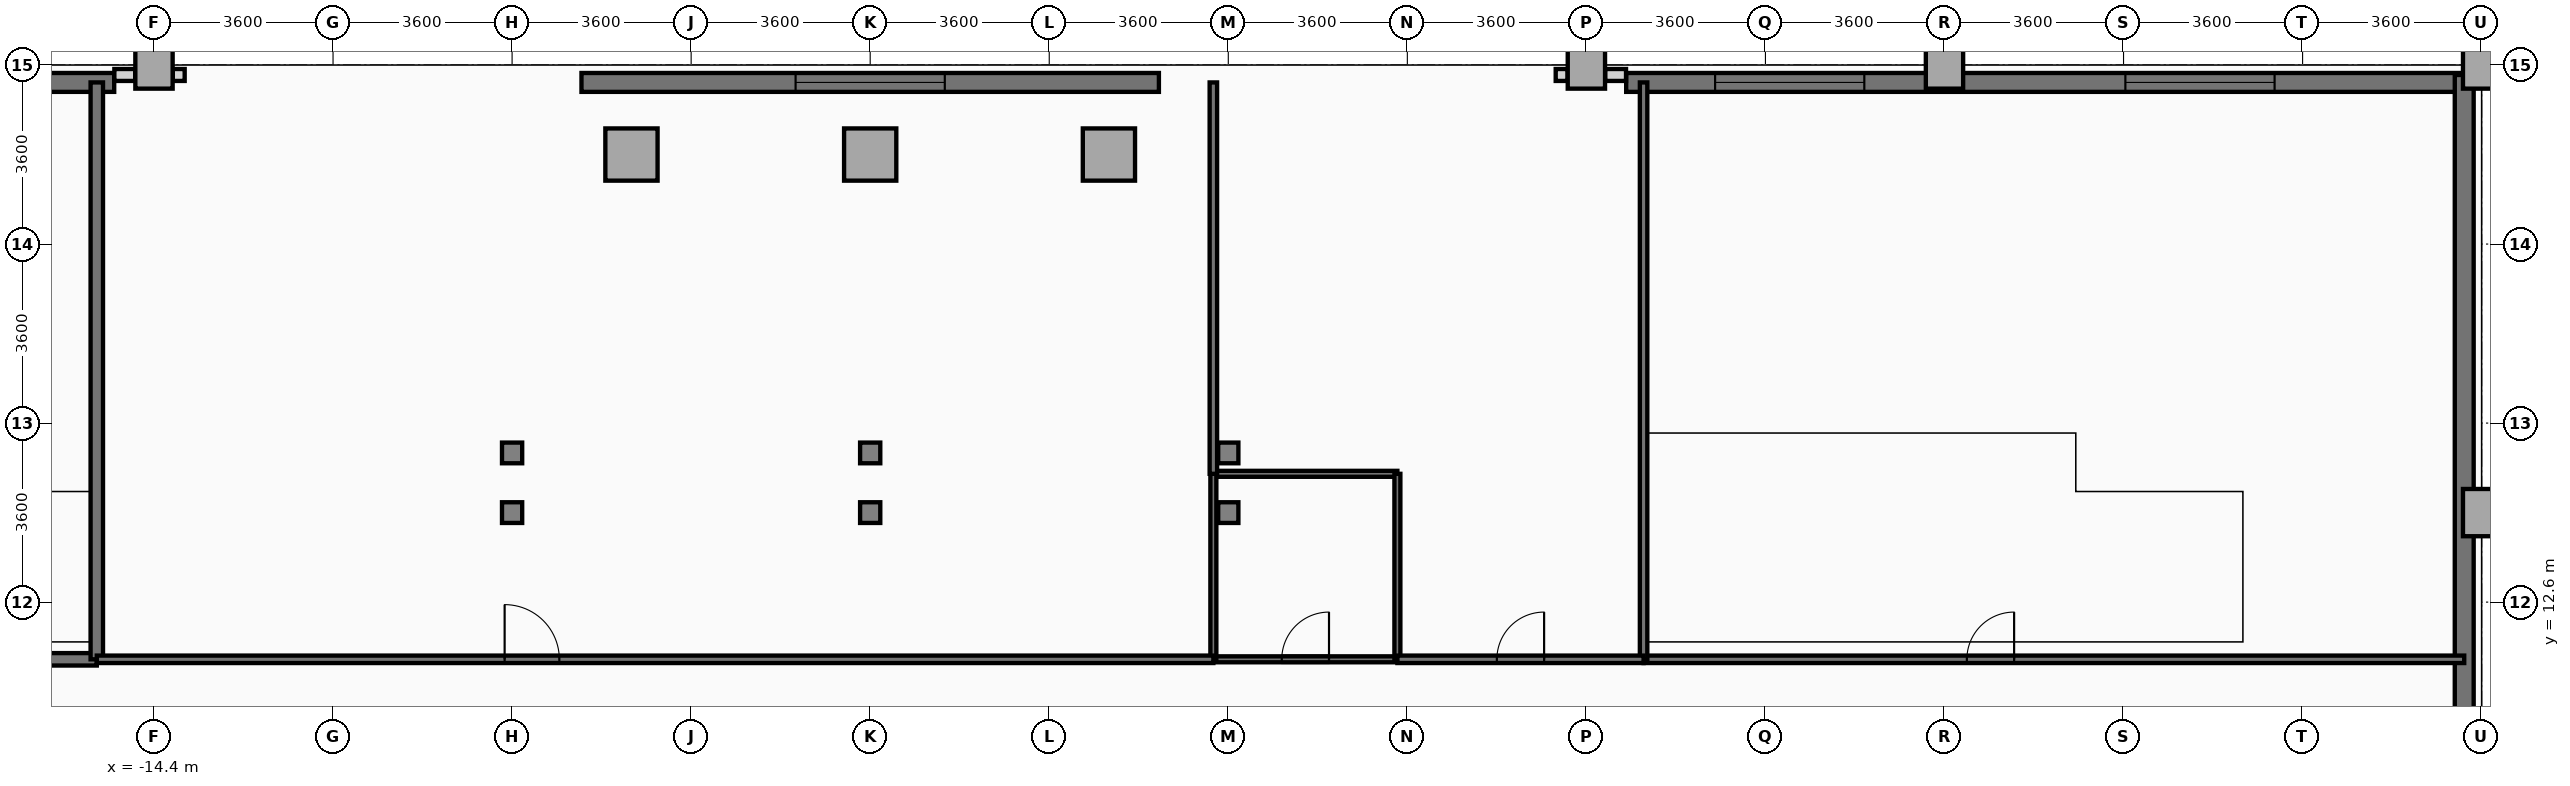
"""IFC4 building model, lengths in metres.
Left out: names, types, materials, properties, quantities, classifications, styles, units other than length and angle.
Written with IfcOpenShell. Run it as: python <this file> out.ifc"""

import sys

from ifc_helpers import new_model, si_unit, direction, frame, frame_2d, origin, origin_2d, place, context, subcontext, project, spatial, rectangle, i_section, extrude, source, transform, mapped, element, fill, save


model = new_model("IFC4")
c1 = context("Model", 3, precision=1e-05, world=origin(), true_north=direction((0.0, 1.0)))
c2 = subcontext(c1, "Body", "Model", "MODEL_VIEW")
j1 = project(units=[si_unit("LENGTHUNIT", "METRE"), si_unit("PLANEANGLEUNIT", "RADIAN")], contexts=[c1])
p1 = place(None, origin())
s1 = spatial("IfcSite", under=j1, at=p1, CompositionType="ELEMENT")
p2 = place(p1, origin())
s2 = spatial("IfcBuilding", under=s1, at=p2, CompositionType="ELEMENT")
p3 = place(p2, frame((0.0, 0.0, 10.2)))
s3 = spatial("IfcBuildingStorey", under=s2, at=p3, CompositionType="ELEMENT", Elevation=10.2)
m1 = source(origin(), c2, "Body", "SweptSolid", [
    extrude(rectangle(XDim=0.75, YDim=0.95, at=origin_2d()), origin(), (0.0, 0.0, 1.0), 5.15),
])
p4 = place(p3, frame((-14.4, 23.4, 0.0), z_axis=(0.0, 0.0, 1.0), x_axis=(1.0, 0.0, 0.0)))
e1 = element("IfcColumn", 1, at=p4, inside=s3, PredefinedType="COLUMN", context=c2, shape_type="MappedRepresentation", body=[
    mapped(m1, transform((0.0, 0.0, 0.0), x_axis=(1.0, 0.0, 0.0), y_axis=(0.0, 1.0, 0.0), z_axis=(0.0, 0.0, 1.0), scale=1.0)),
])
m2 = source(origin(), c2, "Body", "SweptSolid", [
    extrude(i_section(OverallWidth=0.406, OverallDepth=0.416, WebThickness=0.024, FlangeThickness=0.039, at=origin_2d()), origin(), (0.0, 0.0, 1.0), 5.15),
])
for number, where, z_axis, x_axis in (
    (2, (-7.2, 14.4, 0.0), (0.0, 0.0, 1.0), (1.0, 0.0, 0.0)),
    (3, (-7.2, 15.6, 0.0), (0.0, 0.0, 1.0), (1.0, 0.0, 0.0)),
):
    element("IfcColumn", number, at=place(p3, frame(where, z_axis=z_axis, x_axis=x_axis)), inside=s3, PredefinedType="COLUMN", context=c2, shape_type="MappedRepresentation", body=[
        mapped(m2, transform((0.0, 0.0, 0.0), x_axis=(1.0, 0.0, 0.0), y_axis=(0.0, 1.0, 0.0), z_axis=(0.0, 0.0, 1.0), scale=1.0)),
    ])
m3 = source(origin(), c2, "Body", "SweptSolid", [
    extrude(rectangle(XDim=1.05, YDim=1.05, at=origin_2d()), origin(), (0.0, 0.0, 1.0), 5.15),
])
p5 = place(p3, frame((-4.8, 21.6, 0.0), z_axis=(0.0, 0.0, 1.0), x_axis=(1.0, 0.0, 0.0)))
e4 = element("IfcColumn", 4, at=p5, inside=s3, PredefinedType="COLUMN", context=c2, shape_type="MappedRepresentation", body=[
    mapped(m3, transform((0.0, 0.0, 0.0), x_axis=(1.0, 0.0, 0.0), y_axis=(0.0, 1.0, 0.0), z_axis=(0.0, 0.0, 1.0), scale=1.0)),
])
for number, where, z_axis, x_axis in (
    (5, (0.0, 14.4, 0.0), (0.0, 0.0, 1.0), (1.0, 0.0, 0.0)),
    (6, (0.0, 15.6, 0.0), (0.0, 0.0, 1.0), (1.0, 0.0, 0.0)),
):
    element("IfcColumn", number, at=place(p3, frame(where, z_axis=z_axis, x_axis=x_axis)), inside=s3, PredefinedType="COLUMN", context=c2, shape_type="MappedRepresentation", body=[
        mapped(m2, transform((0.0, 0.0, 0.0), x_axis=(1.0, 0.0, 0.0), y_axis=(0.0, 1.0, 0.0), z_axis=(0.0, 0.0, 1.0), scale=1.0)),
    ])
for number, where, z_axis, x_axis in (
    (7, (0.0, 21.6, 0.0), (0.0, 0.0, 1.0), (1.0, 0.0, 0.0)),
    (8, (4.8, 21.6, 0.0), (0.0, 0.0, 1.0), (1.0, 0.0, 0.0)),
):
    element("IfcColumn", number, at=place(p3, frame(where, z_axis=z_axis, x_axis=x_axis)), inside=s3, PredefinedType="COLUMN", context=c2, shape_type="MappedRepresentation", body=[
        mapped(m3, transform((0.0, 0.0, 0.0), x_axis=(1.0, 0.0, 0.0), y_axis=(0.0, 1.0, 0.0), z_axis=(0.0, 0.0, 1.0), scale=1.0)),
    ])
for number, where, z_axis, x_axis in (
    (9, (7.2, 14.4, 0.0), (0.0, 0.0, 1.0), (1.0, 0.0, 0.0)),
    (10, (7.2, 15.6, 0.0), (0.0, 0.0, 1.0), (1.0, 0.0, 0.0)),
):
    element("IfcColumn", number, at=place(p3, frame(where, z_axis=z_axis, x_axis=x_axis)), inside=s3, PredefinedType="COLUMN", context=c2, shape_type="MappedRepresentation", body=[
        mapped(m2, transform((0.0, 0.0, 0.0), x_axis=(1.0, 0.0, 0.0), y_axis=(0.0, 1.0, 0.0), z_axis=(0.0, 0.0, 1.0), scale=1.0)),
    ])
for number, where, z_axis, x_axis in (
    (11, (14.4, 23.4, 0.0), (0.0, 0.0, 1.0), (1.0, 0.0, 0.0)),
    (12, (21.6, 23.4, 0.0), (0.0, 0.0, 1.0), (1.0, 0.0, 0.0)),
    (13, (32.4, 14.4, 0.0), (0.0, 0.0, 1.0), (1.0, 0.0, 0.0)),
    (14, (32.4, 23.4, 0.0), (0.0, 0.0, 1.0), (1.0, 0.0, 0.0)),
):
    element("IfcColumn", number, at=place(p3, frame(where, z_axis=z_axis, x_axis=x_axis)), inside=s3, PredefinedType="COLUMN", context=c2, shape_type="MappedRepresentation", body=[
        mapped(m1, transform((0.0, 0.0, 0.0), x_axis=(1.0, 0.0, 0.0), y_axis=(0.0, 1.0, 0.0), z_axis=(0.0, 0.0, 1.0), scale=1.0)),
    ])
p6 = place(p3, frame((-32.05, 23.05, 0.0), z_axis=(0.0, 0.0, 1.0), x_axis=(1.0, 0.0, 0.0)))
e15 = element("IfcWall", 15, at=p6, inside=s3, PredefinedType="SOLIDWALL", context=c2, shape_type="SweptSolid", body=[
    extrude(rectangle(XDim=16.85, YDim=0.38, at=frame_2d((8.425, 0.0))), origin(), (0.0, 0.0, 1.0), 4.4),
])
p7 = place(p6, frame((3.812, 0.0, 0.95)))
e16 = element("IfcOpeningElement", 16, at=p7, cuts=e15, PredefinedType="OPENING", context=c2, shape_type="SweptSolid", body=[
    extrude(rectangle(XDim=3.0, YDim=2.4, at=frame_2d((1.5, 1.2))), frame((0.0, 0.2, 0.0), z_axis=(0.0, -1.0, 0.0), x_axis=(1.0, 0.0, 0.0)), (0.0, 0.0, 1.0), 0.4),
])
p8 = place(p6, frame((12.062, 0.0, 0.95)))
e17 = element("IfcOpeningElement", 17, at=p8, cuts=e15, PredefinedType="OPENING", context=c2, shape_type="SweptSolid", body=[
    extrude(rectangle(XDim=3.0, YDim=2.4, at=frame_2d((1.5, 1.2))), frame((0.0, 0.2, 0.0), z_axis=(0.0, -1.0, 0.0), x_axis=(1.0, 0.0, 0.0)), (0.0, 0.0, 1.0), 0.4),
])
p9 = place(p3, frame((15.2, 23.05, 0.0), z_axis=(0.0, 0.0, 1.0), x_axis=(1.0, 0.0, 0.0)))
e18 = element("IfcWall", 18, at=p9, inside=s3, PredefinedType="SOLIDWALL", context=c2, shape_type="SweptSolid", body=[
    extrude(rectangle(XDim=16.85, YDim=0.38, at=frame_2d((8.425, 0.0))), origin(), (0.0, 0.0, 1.0), 4.4),
])
p10 = place(p9, frame((1.788, 0.0, 0.95)))
e19 = element("IfcOpeningElement", 19, at=p10, cuts=e18, PredefinedType="OPENING", context=c2, shape_type="SweptSolid", body=[
    extrude(rectangle(XDim=3.0, YDim=2.4, at=frame_2d((1.5, 1.2))), frame((0.0, 0.2, 0.0), z_axis=(0.0, -1.0, 0.0), x_axis=(1.0, 0.0, 0.0)), (0.0, 0.0, 1.0), 0.4),
])
p11 = place(p9, frame((10.037, 0.0, 0.95)))
e20 = element("IfcOpeningElement", 20, at=p11, cuts=e18, PredefinedType="OPENING", context=c2, shape_type="SweptSolid", body=[
    extrude(rectangle(XDim=3.0, YDim=2.4, at=frame_2d((1.5, 1.2))), frame((0.0, 0.2, 0.0), z_axis=(0.0, -1.0, 0.0), x_axis=(1.0, 0.0, 0.0)), (0.0, 0.0, 1.0), 0.4),
])
p12 = place(p3, frame((32.05, -18.8, 0.0), z_axis=(0.0, 0.0, 1.0), x_axis=(0.0, 1.0, 0.0)))
e21 = element("IfcWall", 21, at=p12, inside=s3, PredefinedType="SOLIDWALL", context=c2, shape_type="SweptSolid", body=[
    extrude(rectangle(XDim=42.0, YDim=0.38, at=frame_2d((21.0, 0.0))), origin(), (0.0, 0.0, 1.0), 4.4),
])
p13 = place(p12, frame((5.6, 0.0, 0.95)))
e22 = element("IfcOpeningElement", 22, at=p13, cuts=e21, PredefinedType="OPENING", context=c2, shape_type="SweptSolid", body=[
    extrude(rectangle(XDim=3.0, YDim=2.4, at=frame_2d((1.5, 1.2))), frame((0.0, 0.2, 0.0), z_axis=(0.0, -1.0, 0.0), x_axis=(1.0, 0.0, 0.0)), (0.0, 0.0, 1.0), 0.4),
])
p14 = place(p12, frame((12.8, 0.0, 0.95)))
e23 = element("IfcOpeningElement", 23, at=p14, cuts=e21, PredefinedType="OPENING", context=c2, shape_type="SweptSolid", body=[
    extrude(rectangle(XDim=3.0, YDim=2.4, at=frame_2d((1.5, 1.2))), frame((0.0, 0.2, 0.0), z_axis=(0.0, -1.0, 0.0), x_axis=(1.0, 0.0, 0.0)), (0.0, 0.0, 1.0), 0.4),
])
p15 = place(p12, frame((21.8, 0.0, 0.95)))
e24 = element("IfcOpeningElement", 24, at=p15, cuts=e21, PredefinedType="OPENING", context=c2, shape_type="SweptSolid", body=[
    extrude(rectangle(XDim=3.0, YDim=2.4, at=frame_2d((1.5, 1.2))), frame((0.0, 0.2, 0.0), z_axis=(0.0, -1.0, 0.0), x_axis=(1.0, 0.0, 0.0)), (0.0, 0.0, 1.0), 0.4),
])
p16 = place(p3, frame((-5.805, 23.05, 0.0), z_axis=(0.0, 0.0, 1.0), x_axis=(1.0, 0.0, 0.0)))
e25 = element("IfcWall", 25, at=p16, inside=s3, PredefinedType="SOLIDWALL", context=c2, shape_type="SweptSolid", body=[
    extrude(rectangle(XDim=11.61, YDim=0.38, at=frame_2d((5.805, 0.0))), origin(), (0.0, 0.0, 1.0), 5.15),
])
p17 = place(p16, frame((4.305, 0.0, 0.95)))
e26 = element("IfcOpeningElement", 26, at=p17, cuts=e25, PredefinedType="OPENING", context=c2, shape_type="SweptSolid", body=[
    extrude(rectangle(XDim=3.0, YDim=2.4, at=frame_2d((1.5, 1.2))), frame((0.0, 0.2, 0.0), z_axis=(0.0, -1.0, 0.0), x_axis=(1.0, 0.0, 0.0)), (0.0, 0.0, 1.0), 0.4),
])
p18 = place(p3, frame((-15.197, 23.2, 0.0), z_axis=(0.0, 0.0, 1.0), x_axis=(1.0, 0.0, 0.0)))
e27 = element("IfcWall", 27, at=p18, inside=s3, PredefinedType="PARAPET", context=c2, shape_type="SweptSolid", body=[
    extrude(rectangle(XDim=0.419, YDim=0.24, at=frame_2d((0.209, 0.0))), origin(), (0.0, 0.0, 1.0), 1.15),
])
for number, where, z_axis, x_axis in (
    (28, (-14.022, 23.2, 0.0), (0.0, 0.0, 1.0), (1.0, 0.0, 0.0)),
    (29, (13.783, 23.2, 0.0), (0.0, 0.0, 1.0), (1.0, 0.0, 0.0)),
):
    element("IfcWall", number, at=place(p3, frame(where, z_axis=z_axis, x_axis=x_axis)), inside=s3, PredefinedType="PARAPET", context=c2, shape_type="SweptSolid", body=[
        extrude(rectangle(XDim=0.239, YDim=0.24, at=frame_2d((0.12, 0.0))), origin(), (0.0, 0.0, 1.0), 1.15),
    ])
p19 = place(p3, frame((14.778, 23.2, 0.0), z_axis=(0.0, 0.0, 1.0), x_axis=(1.0, 0.0, 0.0)))
e30 = element("IfcWall", 30, at=p19, inside=s3, PredefinedType="PARAPET", context=c2, shape_type="SweptSolid", body=[
    extrude(rectangle(XDim=0.419, YDim=0.24, at=frame_2d((0.209, 0.0))), origin(), (0.0, 0.0, 1.0), 1.15),
])
p20 = place(p3, frame((6.9, 11.45, 0.0), z_axis=(0.0, 0.0, 1.0), x_axis=(1.0, 0.0, 0.0)))
e31 = element("IfcWall", 31, at=p20, inside=s3, PredefinedType="PARTITIONING", context=c2, shape_type="SweptSolid", body=[
    extrude(rectangle(XDim=3.7, YDim=0.12, at=frame_2d((1.85, 0.0))), origin(), (0.0, 0.0, 1.0), 5.15),
])
p21 = place(p20, frame((1.375, 0.0, 0.0)))
e32 = element("IfcOpeningElement", 32, at=p21, cuts=e31, PredefinedType="OPENING", context=c2, shape_type="SweptSolid", body=[
    extrude(rectangle(XDim=0.95, YDim=2.15, at=frame_2d((0.475, 1.075))), frame((0.0, 0.07, 0.0), z_axis=(0.0, -1.0, 0.0), x_axis=(1.0, 0.0, 0.0)), (0.0, 0.0, 1.0), 0.14),
])
p22 = place(p3, frame((6.9, 15.18, 0.0), z_axis=(0.0, 0.0, 1.0), x_axis=(1.0, 0.0, 0.0)))
e33 = element("IfcWall", 33, at=p22, inside=s3, PredefinedType="PARTITIONING", context=c2, shape_type="SweptSolid", body=[
    extrude(rectangle(XDim=3.7, YDim=0.12, at=frame_2d((1.85, 0.0))), origin(), (0.0, 0.0, 1.0), 5.15),
])
p23 = place(p3, frame((6.9, 11.45, 0.0), z_axis=(0.0, 0.0, 1.0), x_axis=(0.0, 1.0, 0.0)))
e34 = element("IfcWall", 34, at=p23, inside=s3, PredefinedType="PARTITIONING", context=c2, shape_type="SweptSolid", body=[
    extrude(rectangle(XDim=3.73, YDim=0.12, at=frame_2d((1.865, 0.0))), origin(), (0.0, 0.0, 1.0), 4.45),
])
p24 = place(p3, frame((10.6, 11.45, 0.0), z_axis=(0.0, 0.0, 1.0), x_axis=(0.0, 1.0, 0.0)))
e35 = element("IfcWall", 35, at=p24, inside=s3, PredefinedType="PARTITIONING", context=c2, shape_type="SweptSolid", body=[
    extrude(rectangle(XDim=3.73, YDim=0.12, at=frame_2d((1.865, 0.0))), origin(), (0.0, 0.0, 1.0), 5.15),
])
p25 = place(p3, frame((-32.05, 11.45, 0.0), z_axis=(0.0, 0.0, 1.0), x_axis=(1.0, 0.0, 0.0)))
e36 = element("IfcWall", 36, at=p25, inside=s3, PredefinedType="SOLIDWALL", context=c2, shape_type="SweptSolid", body=[
    extrude(rectangle(XDim=16.5, YDim=0.25, at=frame_2d((8.25, 0.0))), origin(), (0.0, 0.0, 1.0), 5.15),
])
p26 = place(p25, frame((6.5, 0.0, 0.0)))
e37 = element("IfcOpeningElement", 37, at=p26, cuts=e36, PredefinedType="OPENING", context=c2, shape_type="SweptSolid", body=[
    extrude(rectangle(XDim=0.95, YDim=2.15, at=frame_2d((0.475, 1.075))), frame((0.0, 0.135, 0.0), z_axis=(0.0, -1.0, 0.0), x_axis=(1.0, 0.0, 0.0)), (0.0, 0.0, 1.0), 0.27),
])
p27 = place(p3, frame((-15.55, 11.45, 0.0), z_axis=(0.0, 0.0, 1.0), x_axis=(0.0, 1.0, 0.0)))
e38 = element("IfcWall", 38, at=p27, inside=s3, PredefinedType="SOLIDWALL", context=c2, shape_type="SweptSolid", body=[
    extrude(rectangle(XDim=11.6, YDim=0.25, at=frame_2d((5.8, 0.0))), origin(), (0.0, 0.0, 1.0), 5.15),
])
p28 = place(p3, frame((15.55, 11.45, 0.0), z_axis=(0.0, 0.0, 1.0), x_axis=(1.0, 0.0, 0.0)))
e39 = element("IfcWall", 39, at=p28, inside=s3, PredefinedType="PARTITIONING", context=c2, shape_type="SweptSolid", body=[
    extrude(rectangle(XDim=16.5, YDim=0.15, at=frame_2d((8.25, 0.0))), origin(), (0.0, 0.0, 1.0), 5.15),
])
p29 = place(p28, frame((6.5, 0.0, 0.0)))
e40 = element("IfcOpeningElement", 40, at=p29, cuts=e39, PredefinedType="OPENING", context=c2, shape_type="SweptSolid", body=[
    extrude(rectangle(XDim=0.95, YDim=2.15, at=frame_2d((0.475, 1.075))), frame((0.0, 0.085, 0.0), z_axis=(0.0, -1.0, 0.0), x_axis=(1.0, 0.0, 0.0)), (0.0, 0.0, 1.0), 0.17),
])
p30 = place(p3, frame((15.55, 11.45, 0.0), z_axis=(0.0, 0.0, 1.0), x_axis=(0.0, 1.0, 0.0)))
e41 = element("IfcWall", 41, at=p30, inside=s3, PredefinedType="PARTITIONING", context=c2, shape_type="SweptSolid", body=[
    extrude(rectangle(XDim=11.6, YDim=0.15, at=frame_2d((5.8, 0.0))), origin(), (0.0, 0.0, 1.0), 5.15),
])
p31 = place(p3, frame((-15.55, 11.45, 0.0), z_axis=(0.0, 0.0, 1.0), x_axis=(1.0, 0.0, 0.0)))
e42 = element("IfcWall", 42, at=p31, inside=s3, PredefinedType="PARTITIONING", context=c2, shape_type="SweptSolid", body=[
    extrude(rectangle(XDim=22.45, YDim=0.15, at=frame_2d((11.225, 0.0))), origin(), (0.0, 0.0, 1.0), 4.55),
])
p32 = place(p31, frame((8.2, 0.0, 0.0)))
e43 = element("IfcOpeningElement", 43, at=p32, cuts=e42, PredefinedType="OPENING", context=c2, shape_type="SweptSolid", body=[
    extrude(rectangle(XDim=1.1, YDim=2.2, at=frame_2d((0.55, 1.1))), frame((0.0, 0.085, 0.0), z_axis=(0.0, -1.0, 0.0), x_axis=(1.0, 0.0, 0.0)), (0.0, 0.0, 1.0), 0.17),
])
p33 = place(p3, frame((6.9, 15.18, 0.0), z_axis=(0.0, 0.0, 1.0), x_axis=(0.0, 1.0, 0.0)))
e44 = element("IfcWall", 44, at=p33, inside=s3, PredefinedType="PARTITIONING", context=c2, shape_type="SweptSolid", body=[
    extrude(rectangle(XDim=7.87, YDim=0.15, at=frame_2d((3.935, 0.0))), origin(), (0.0, 0.0, 1.0), 4.45),
])
p34 = place(p3, frame((10.6, 11.45, 0.0), z_axis=(0.0, 0.0, 1.0), x_axis=(1.0, 0.0, 0.0)))
e45 = element("IfcWall", 45, at=p34, inside=s3, PredefinedType="PARTITIONING", context=c2, shape_type="SweptSolid", body=[
    extrude(rectangle(XDim=4.95, YDim=0.15, at=frame_2d((2.475, 0.0))), origin(), (0.0, 0.0, 1.0), 4.55),
])
p35 = place(p34, frame((2.0, 0.0, 0.0)))
e46 = element("IfcOpeningElement", 46, at=p35, cuts=e45, PredefinedType="OPENING", context=c2, shape_type="SweptSolid", body=[
    extrude(rectangle(XDim=0.95, YDim=2.15, at=frame_2d((0.475, 1.075))), frame((0.0, 0.085, 0.0), z_axis=(0.0, -1.0, 0.0), x_axis=(1.0, 0.0, 0.0)), (0.0, 0.0, 1.0), 0.17),
])
m4 = source(origin(), c2, "Body", "SweptSolid", [
    extrude(rectangle(XDim=3.0, YDim=2.4, at=frame_2d((1.5, 1.2))), frame((0.0, 0.03, 0.0), z_axis=(0.0, -1.0, 0.0), x_axis=(1.0, 0.0, 0.0)), (0.0, 0.0, 1.0), 0.06),
])
p36 = place(p10, origin())
e47 = element("IfcWindow", 47, at=p36, inside=s3, PartitioningType="SINGLE_PANEL", PredefinedType="WINDOW", context=c2, shape_type="MappedRepresentation", body=[
    mapped(m4, transform((0.0, 0.0, 0.0), x_axis=(1.0, 0.0, 0.0), y_axis=(0.0, 1.0, 0.0), z_axis=(0.0, 0.0, 1.0), scale=1.0)),
])
fill(e19, e47)
p37 = place(p11, origin())
e48 = element("IfcWindow", 48, at=p37, inside=s3, PartitioningType="SINGLE_PANEL", PredefinedType="WINDOW", context=c2, shape_type="MappedRepresentation", body=[
    mapped(m4, transform((0.0, 0.0, 0.0), x_axis=(1.0, 0.0, 0.0), y_axis=(0.0, 1.0, 0.0), z_axis=(0.0, 0.0, 1.0), scale=1.0)),
])
fill(e20, e48)
p38 = place(p17, origin())
e49 = element("IfcWindow", 49, at=p38, inside=s3, PartitioningType="SINGLE_PANEL", PredefinedType="WINDOW", context=c2, shape_type="MappedRepresentation", body=[
    mapped(m4, transform((0.0, 0.0, 0.0), x_axis=(1.0, 0.0, 0.0), y_axis=(0.0, 1.0, 0.0), z_axis=(0.0, 0.0, 1.0), scale=1.0)),
])
fill(e26, e49)
m5 = source(origin(), c2, "Body", "SweptSolid", [
    extrude(rectangle(XDim=0.95, YDim=2.15, at=frame_2d((0.475, 1.075))), frame((0.0, 0.025, 0.0), z_axis=(0.0, -1.0, 0.0), x_axis=(1.0, 0.0, 0.0)), (0.0, 0.0, 1.0), 0.05),
])
p39 = place(p21, origin())
e50 = element("IfcDoor", 50, at=p39, inside=s3, OperationType="SINGLE_SWING_RIGHT", PredefinedType="DOOR", context=c2, shape_type="MappedRepresentation", body=[
    mapped(m5, transform((0.0, 0.0, 0.0), x_axis=(1.0, 0.0, 0.0), y_axis=(0.0, 1.0, 0.0), z_axis=(0.0, 0.0, 1.0), scale=1.0)),
])
fill(e32, e50)
p40 = place(p29, origin())
e51 = element("IfcDoor", 51, at=p40, inside=s3, OperationType="SINGLE_SWING_RIGHT", PredefinedType="DOOR", context=c2, shape_type="MappedRepresentation", body=[
    mapped(m5, transform((0.0, 0.0, 0.0), x_axis=(1.0, 0.0, 0.0), y_axis=(0.0, 1.0, 0.0), z_axis=(0.0, 0.0, 1.0), scale=1.0)),
])
fill(e40, e51)
m6 = source(origin(), c2, "Body", "SweptSolid", [
    extrude(rectangle(XDim=1.1, YDim=2.2, at=frame_2d((0.55, 1.1))), frame((0.0, 0.025, 0.0), z_axis=(0.0, -1.0, 0.0), x_axis=(1.0, 0.0, 0.0)), (0.0, 0.0, 1.0), 0.05),
])
p41 = place(p32, origin())
e52 = element("IfcDoor", 52, at=p41, inside=s3, OperationType="SINGLE_SWING_LEFT", PredefinedType="DOOR", context=c2, shape_type="MappedRepresentation", body=[
    mapped(m6, transform((0.0, 0.0, 0.0), x_axis=(1.0, 0.0, 0.0), y_axis=(0.0, 1.0, 0.0), z_axis=(0.0, 0.0, 1.0), scale=1.0)),
])
fill(e43, e52)
p42 = place(p35, origin())
e53 = element("IfcDoor", 53, at=p42, inside=s3, OperationType="SINGLE_SWING_RIGHT", PredefinedType="DOOR", context=c2, shape_type="MappedRepresentation", body=[
    mapped(m5, transform((0.0, 0.0, 0.0), x_axis=(1.0, 0.0, 0.0), y_axis=(0.0, 1.0, 0.0), z_axis=(0.0, 0.0, 1.0), scale=1.0)),
])
fill(e46, e53)
save(model, sys.argv[1])
